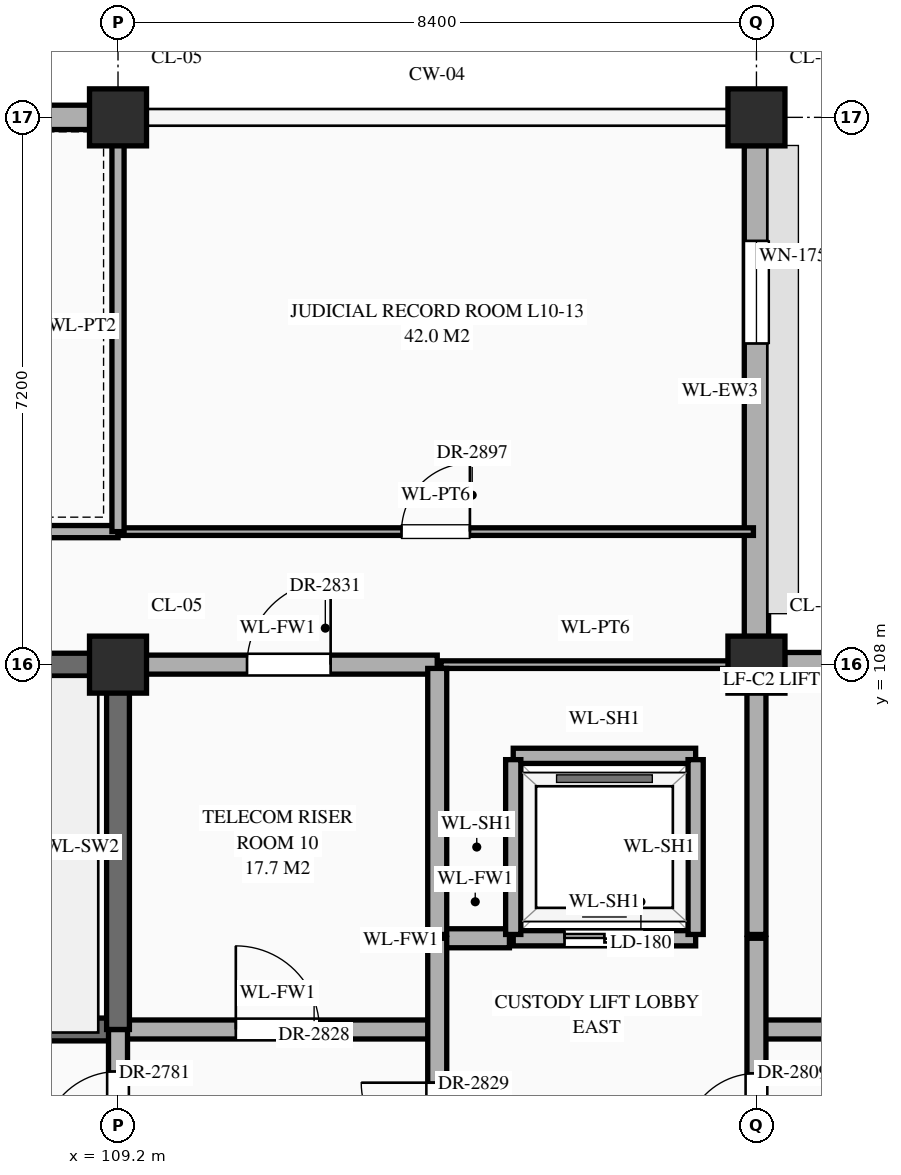
"""IFC4 building model, lengths in metres.
Left out: names, types, materials, properties, quantities, classifications, styles, units other than length and angle.
Written with IfcOpenShell. Run it as: python <this file> out.ifc"""

import sys

from ifc_helpers import new_model, si_unit, direction, frame, frame_2d, origin, origin_2d, place, context, subcontext, project, spatial, rectangle, extrude, element, fill, save


model = new_model("IFC4")
c1 = context("Model", 3, precision=1e-05, world=origin(), true_north=direction((0.0, 1.0)))
c2 = subcontext(c1, "Body", "Model", "MODEL_VIEW")
j1 = project(units=[si_unit("LENGTHUNIT", "METRE"), si_unit("PLANEANGLEUNIT", "RADIAN")], contexts=[c1])
p1 = place(None, origin())
s1 = spatial("IfcSite", under=j1, at=p1, CompositionType="ELEMENT")
p2 = place(p1, origin())
s2 = spatial("IfcBuilding", under=s1, at=p2, CompositionType="ELEMENT")
p3 = place(p2, frame((0.0, 0.0, 43.5)))
s3 = spatial("IfcBuildingStorey", under=s2, at=p3, CompositionType="ELEMENT", Elevation=43.5)
for number, where, z_axis, x_axis in (
    (1, (109.2, 108.0, 0.0), (0.0, 0.0, 1.0), (1.0, 0.0, 0.0)),
    (2, (109.2, 115.2, 0.0), (0.0, 0.0, 1.0), (1.0, 0.0, 0.0)),
    (3, (117.6, 108.0, 0.0), (0.0, 0.0, 1.0), (1.0, 0.0, 0.0)),
    (4, (117.6, 115.2, 0.0), (0.0, 0.0, 1.0), (1.0, 0.0, 0.0)),
):
    element("IfcColumn", number, at=place(p3, frame(where, z_axis=z_axis, x_axis=x_axis)), inside=s3, PredefinedType="COLUMN", context=c2, shape_type="SweptSolid", body=[
        extrude(rectangle(XDim=0.75, YDim=0.75, at=origin_2d()), origin(), (0.0, 0.0, 1.0), 4.2),
    ])
p4 = place(p3, frame((101.17, 115.2, 0.0), z_axis=(0.0, 0.0, 1.0), x_axis=(1.0, 0.0, 0.0)))
e5 = element("IfcWall", 5, at=p4, inside=s3, PredefinedType="STANDARD", context=c2, shape_type="SweptSolid", body=[
    extrude(rectangle(XDim=7.66, YDim=0.32, at=frame_2d((3.83, 0.0))), origin(), (0.0, 0.0, 1.0), 3.35),
])
p5 = place(p3, frame((117.6, 108.37, 0.0), z_axis=(0.0, 0.0, 1.0), x_axis=(0.0, 1.0, 0.0)))
e6 = element("IfcWall", 6, at=p5, inside=s3, PredefinedType="STANDARD", context=c2, shape_type="SweptSolid", body=[
    extrude(rectangle(XDim=6.46, YDim=0.32, at=frame_2d((3.23, 0.0))), origin(), (0.0, 0.0, 1.0), 3.35),
])
p6 = place(p5, frame((3.855, 0.0, 0.85)))
e7 = element("IfcOpeningElement", 7, at=p6, cuts=e6, PredefinedType="OPENING", context=c2, shape_type="SweptSolid", body=[
    extrude(rectangle(XDim=1.35, YDim=1.38, at=frame_2d((0.675, 0.69))), frame((0.0, 0.172, 0.0), z_axis=(0.0, -1.0, 0.0), x_axis=(1.0, 0.0, 0.0)), (0.0, 0.0, 1.0), 0.344),
])
p7 = place(p3, frame((117.97, 108.0, 0.0), z_axis=(0.0, 0.0, 1.0), x_axis=(1.0, 0.0, 0.0)))
e8 = element("IfcWall", 8, at=p7, inside=s3, PredefinedType="STANDARD", context=c2, shape_type="SweptSolid", body=[
    extrude(rectangle(XDim=7.66, YDim=0.32, at=frame_2d((3.83, 0.0))), origin(), (0.0, 0.0, 1.0), 3.35),
])
p8 = place(p3, frame((100.8, 103.2, 0.0), z_axis=(0.0, 0.0, 1.0), x_axis=(1.0, 0.0, 0.0)))
e9 = element("IfcWall", 9, at=p8, inside=s3, PredefinedType="SHEAR", context=c2, shape_type="SweptSolid", body=[
    extrude(rectangle(XDim=8.4, YDim=0.3, at=frame_2d((4.2, 0.0))), origin(), (0.0, 0.0, 1.0), 3.95),
])
p9 = place(p8, frame((0.65, 0.0, 0.0)))
e10 = element("IfcOpeningElement", 10, at=p9, cuts=e9, PredefinedType="OPENING", context=c2, shape_type="SweptSolid", body=[
    extrude(rectangle(XDim=1.1, YDim=2.2, at=frame_2d((0.55, 1.1))), frame((0.0, 0.162, 0.0), z_axis=(0.0, -1.0, 0.0), x_axis=(1.0, 0.0, 0.0)), (0.0, 0.0, 1.0), 0.324),
])
p10 = place(p3, frame((109.2, 103.2, 0.0), z_axis=(0.0, 0.0, 1.0), x_axis=(1.0, 0.0, 0.0)))
e11 = element("IfcWall", 11, at=p10, inside=s3, PredefinedType="STANDARD", context=c2, shape_type="SweptSolid", body=[
    extrude(rectangle(XDim=4.2, YDim=0.25, at=frame_2d((2.1, 0.0))), origin(), (0.0, 0.0, 1.0), 3.95),
])
p11 = place(p10, frame((1.55, 0.0, 0.0)))
e12 = element("IfcOpeningElement", 12, at=p11, cuts=e11, PredefinedType="OPENING", context=c2, shape_type="SweptSolid", body=[
    extrude(rectangle(XDim=1.1, YDim=2.2, at=frame_2d((0.55, 1.1))), frame((0.0, 0.137, 0.0), z_axis=(0.0, -1.0, 0.0), x_axis=(1.0, 0.0, 0.0)), (0.0, 0.0, 1.0), 0.274),
])
p12 = place(p3, frame((117.6, 103.2, 0.0), z_axis=(0.0, 0.0, 1.0), x_axis=(1.0, 0.0, 0.0)))
e13 = element("IfcWall", 13, at=p12, inside=s3, PredefinedType="STANDARD", context=c2, shape_type="SweptSolid", body=[
    extrude(rectangle(XDim=4.2, YDim=0.25, at=frame_2d((2.1, 0.0))), origin(), (0.0, 0.0, 1.0), 4.0),
])
p13 = place(p12, frame((1.55, 0.0, 0.0)))
e14 = element("IfcOpeningElement", 14, at=p13, cuts=e13, PredefinedType="OPENING", context=c2, shape_type="SweptSolid", body=[
    extrude(rectangle(XDim=1.1, YDim=2.2, at=frame_2d((0.55, 1.1))), frame((0.0, 0.137, 0.0), z_axis=(0.0, -1.0, 0.0), x_axis=(1.0, 0.0, 0.0)), (0.0, 0.0, 1.0), 0.274),
])
p14 = place(p3, frame((113.45, 104.4, 0.0), z_axis=(0.0, 0.0, 1.0), x_axis=(1.0, 0.0, 0.0)))
e15 = element("IfcWall", 15, at=p14, inside=s3, PredefinedType="STANDARD", context=c2, shape_type="SweptSolid", body=[
    extrude(rectangle(XDim=0.9, YDim=0.25, at=frame_2d((0.45, 0.0))), origin(), (0.0, 0.0, 1.0), 3.95),
])
p15 = place(p3, frame((114.4, 104.4, 0.0), z_axis=(0.0, 0.0, 1.0), x_axis=(1.0, 0.0, 0.0)))
e16 = element("IfcWall", 16, at=p15, inside=s3, PredefinedType="STANDARD", context=c2, shape_type="SweptSolid", body=[
    extrude(rectangle(XDim=2.4, YDim=0.2, at=frame_2d((1.2, 0.0))), origin(), (0.0, 0.0, 1.0), 3.95),
])
p16 = place(p15, frame((0.675, 0.0, 0.0)))
e17 = element("IfcOpeningElement", 17, at=p16, cuts=e16, PredefinedType="OPENING", context=c2, shape_type="SweptSolid", body=[
    extrude(rectangle(XDim=1.05, YDim=2.15, at=frame_2d((0.525, 1.075))), frame((0.0, 0.112, 0.0), z_axis=(0.0, -1.0, 0.0), x_axis=(1.0, 0.0, 0.0)), (0.0, 0.0, 1.0), 0.224),
])
p17 = place(p3, frame((114.4, 106.8, 0.0), z_axis=(0.0, 0.0, 1.0), x_axis=(1.0, 0.0, 0.0)))
e18 = element("IfcWall", 18, at=p17, inside=s3, PredefinedType="STANDARD", context=c2, shape_type="SweptSolid", body=[
    extrude(rectangle(XDim=2.4, YDim=0.2, at=frame_2d((1.2, 0.0))), origin(), (0.0, 0.0, 1.0), 3.95),
])
p18 = place(p3, frame((100.8, 108.0, 0.0), z_axis=(0.0, 0.0, 1.0), x_axis=(1.0, 0.0, 0.0)))
e19 = element("IfcWall", 19, at=p18, inside=s3, PredefinedType="SHEAR", context=c2, shape_type="SweptSolid", body=[
    extrude(rectangle(XDim=8.4, YDim=0.3, at=frame_2d((4.2, 0.0))), origin(), (0.0, 0.0, 1.0), 3.95),
])
p19 = place(p3, frame((109.2, 108.0, 0.0), z_axis=(0.0, 0.0, 1.0), x_axis=(1.0, 0.0, 0.0)))
e20 = element("IfcWall", 20, at=p19, inside=s3, PredefinedType="STANDARD", context=c2, shape_type="SweptSolid", body=[
    extrude(rectangle(XDim=4.2, YDim=0.25, at=frame_2d((2.1, 0.0))), origin(), (0.0, 0.0, 1.0), 3.1),
])
p20 = place(p19, frame((1.698, 0.0, 0.0)))
e21 = element("IfcOpeningElement", 21, at=p20, cuts=e20, PredefinedType="OPENING", context=c2, shape_type="SweptSolid", body=[
    extrude(rectangle(XDim=1.1, YDim=2.2, at=frame_2d((0.55, 1.1))), frame((0.0, 0.137, 0.0), z_axis=(0.0, -1.0, 0.0), x_axis=(1.0, 0.0, 0.0)), (0.0, 0.0, 1.0), 0.274),
])
p21 = place(p3, frame((113.45, 108.0, 0.0), z_axis=(0.0, 0.0, 1.0), x_axis=(1.0, 0.0, 0.0)))
e22 = element("IfcWall", 22, at=p21, inside=s3, PredefinedType="STANDARD", context=c2, shape_type="SweptSolid", body=[
    extrude(rectangle(XDim=4.06, YDim=0.1, at=frame_2d((2.03, 0.0))), origin(), (0.0, 0.0, 1.0), 3.1),
])
p22 = place(p3, frame((92.4, 109.75, 0.0), z_axis=(0.0, 0.0, 1.0), x_axis=(1.0, 0.0, 0.0)))
e23 = element("IfcWall", 23, at=p22, inside=s3, PredefinedType="STANDARD", context=c2, shape_type="SweptSolid", body=[
    extrude(rectangle(XDim=16.8, YDim=0.16, at=frame_2d((8.4, 0.0))), origin(), (0.0, 0.0, 1.0), 4.0),
])
p23 = place(p22, frame((7.625, 0.0, 0.0)))
e24 = element("IfcOpeningElement", 24, at=p23, cuts=e23, PredefinedType="OPENING", context=c2, shape_type="SweptSolid", body=[
    extrude(rectangle(XDim=1.55, YDim=2.35, at=frame_2d((0.775, 1.175))), frame((0.0, 0.092, 0.0), z_axis=(0.0, -1.0, 0.0), x_axis=(1.0, 0.0, 0.0)), (0.0, 0.0, 1.0), 0.184),
])
p24 = place(p3, frame((109.2, 109.75, 0.0), z_axis=(0.0, 0.0, 1.0), x_axis=(1.0, 0.0, 0.0)))
e25 = element("IfcWall", 25, at=p24, inside=s3, PredefinedType="STANDARD", context=c2, shape_type="SweptSolid", body=[
    extrude(rectangle(XDim=8.36, YDim=0.1, at=frame_2d((4.18, 0.0))), origin(), (0.0, 0.0, 1.0), 4.0),
])
p25 = place(p24, frame((3.73, 0.0, 0.0)))
e26 = element("IfcOpeningElement", 26, at=p25, cuts=e25, PredefinedType="OPENING", context=c2, shape_type="SweptSolid", body=[
    extrude(rectangle(XDim=0.9, YDim=2.15, at=frame_2d((0.45, 1.075))), frame((0.0, 0.062, 0.0), z_axis=(0.0, -1.0, 0.0), x_axis=(1.0, 0.0, 0.0)), (0.0, 0.0, 1.0), 0.124),
])
p26 = place(p3, frame((109.2, 100.8, 0.0), z_axis=(0.0, 0.0, 1.0), x_axis=(0.0, 1.0, 0.0)))
e27 = element("IfcWall", 27, at=p26, inside=s3, PredefinedType="STANDARD", context=c2, shape_type="SweptSolid", body=[
    extrude(rectangle(XDim=2.4, YDim=0.25, at=frame_2d((1.2, 0.0))), origin(), (0.0, 0.0, 1.0), 3.2),
])
p27 = place(p26, frame((0.847, 0.0, 0.0)))
e28 = element("IfcOpeningElement", 28, at=p27, cuts=e27, PredefinedType="OPENING", context=c2, shape_type="SweptSolid", body=[
    extrude(rectangle(XDim=1.0, YDim=2.2, at=frame_2d((0.5, 1.1))), frame((0.0, 0.137, 0.0), z_axis=(0.0, -1.0, 0.0), x_axis=(1.0, 0.0, 0.0)), (0.0, 0.0, 1.0), 0.274),
])
p28 = place(p3, frame((109.2, 103.2, 0.0), z_axis=(0.0, 0.0, 1.0), x_axis=(0.0, 1.0, 0.0)))
e29 = element("IfcWall", 29, at=p28, inside=s3, PredefinedType="SHEAR", context=c2, shape_type="SweptSolid", body=[
    extrude(rectangle(XDim=4.8, YDim=0.3, at=frame_2d((2.4, 0.0))), origin(), (0.0, 0.0, 1.0), 3.95),
])
p29 = place(p3, frame((109.2, 109.75, 0.0), z_axis=(0.0, 0.0, 1.0), x_axis=(0.0, 1.0, 0.0)))
e30 = element("IfcWall", 30, at=p29, inside=s3, PredefinedType="STANDARD", context=c2, shape_type="SweptSolid", body=[
    extrude(rectangle(XDim=5.41, YDim=0.16, at=frame_2d((2.705, 0.0))), origin(), (0.0, 0.0, 1.0), 3.25),
])
p30 = place(p3, frame((113.4, 100.8, 0.0), z_axis=(0.0, 0.0, 1.0), x_axis=(0.0, 1.0, 0.0)))
e31 = element("IfcWall", 31, at=p30, inside=s3, PredefinedType="STANDARD", context=c2, shape_type="SweptSolid", body=[
    extrude(rectangle(XDim=3.6, YDim=0.25, at=frame_2d((1.8, 0.0))), origin(), (0.0, 0.0, 1.0), 3.95),
])
p31 = place(p30, frame((0.7, 0.0, 0.0)))
e32 = element("IfcOpeningElement", 32, at=p31, cuts=e31, PredefinedType="OPENING", context=c2, shape_type="SweptSolid", body=[
    extrude(rectangle(XDim=1.0, YDim=2.2, at=frame_2d((0.5, 1.1))), frame((0.0, 0.137, 0.0), z_axis=(0.0, -1.0, 0.0), x_axis=(1.0, 0.0, 0.0)), (0.0, 0.0, 1.0), 0.274),
])
p32 = place(p3, frame((113.4, 104.45, 0.0), z_axis=(0.0, 0.0, 1.0), x_axis=(0.0, 1.0, 0.0)))
e33 = element("IfcWall", 33, at=p32, inside=s3, PredefinedType="STANDARD", context=c2, shape_type="SweptSolid", body=[
    extrude(rectangle(XDim=3.5, YDim=0.25, at=frame_2d((1.75, 0.0))), origin(), (0.0, 0.0, 1.0), 3.95),
])
for number, where, z_axis, x_axis in (
    (34, (114.4, 104.45, 0.0), (0.0, 0.0, 1.0), (0.0, 1.0, 0.0)),
    (35, (116.8, 104.45, 0.0), (0.0, 0.0, 1.0), (0.0, 1.0, 0.0)),
):
    element("IfcWall", number, at=place(p3, frame(where, z_axis=z_axis, x_axis=x_axis)), inside=s3, PredefinedType="STANDARD", context=c2, shape_type="SweptSolid", body=[
        extrude(rectangle(XDim=2.3, YDim=0.2, at=frame_2d((1.15, 0.0))), origin(), (0.0, 0.0, 1.0), 3.95),
    ])
p33 = place(p3, frame((117.6, 91.2, 0.0), z_axis=(0.0, 0.0, 1.0), x_axis=(0.0, 1.0, 0.0)))
e36 = element("IfcWall", 36, at=p33, inside=s3, PredefinedType="STANDARD", context=c2, shape_type="SweptSolid", body=[
    extrude(rectangle(XDim=13.2, YDim=0.25, at=frame_2d((6.6, 0.0))), origin(), (0.0, 0.0, 1.0), 3.2),
])
p34 = place(p33, frame((0.502, 0.0, 0.0)))
e37 = element("IfcOpeningElement", 37, at=p34, cuts=e36, PredefinedType="OPENING", context=c2, shape_type="SweptSolid", body=[
    extrude(rectangle(XDim=1.1, YDim=2.2, at=frame_2d((0.55, 1.1))), frame((0.0, 0.137, 0.0), z_axis=(0.0, -1.0, 0.0), x_axis=(1.0, 0.0, 0.0)), (0.0, 0.0, 1.0), 0.274),
])
p35 = place(p33, frame((10.472, 0.0, 0.0)))
e38 = element("IfcOpeningElement", 38, at=p35, cuts=e36, PredefinedType="OPENING", context=c2, shape_type="SweptSolid", body=[
    extrude(rectangle(XDim=0.95, YDim=2.15, at=frame_2d((0.475, 1.075))), frame((0.0, 0.137, 0.0), z_axis=(0.0, -1.0, 0.0), x_axis=(1.0, 0.0, 0.0)), (0.0, 0.0, 1.0), 0.274),
])
p36 = place(p33, frame((3.272, 0.0, 0.0)))
e39 = element("IfcOpeningElement", 39, at=p36, cuts=e36, PredefinedType="OPENING", context=c2, shape_type="SweptSolid", body=[
    extrude(rectangle(XDim=0.95, YDim=2.15, at=frame_2d((0.475, 1.075))), frame((0.0, 0.137, 0.0), z_axis=(0.0, -1.0, 0.0), x_axis=(1.0, 0.0, 0.0)), (0.0, 0.0, 1.0), 0.274),
])
p37 = place(p3, frame((117.6, 104.45, 0.0), z_axis=(0.0, 0.0, 1.0), x_axis=(0.0, 1.0, 0.0)))
e40 = element("IfcWall", 40, at=p37, inside=s3, PredefinedType="STANDARD", context=c2, shape_type="SweptSolid", body=[
    extrude(rectangle(XDim=3.46, YDim=0.25, at=frame_2d((1.73, 0.0))), origin(), (0.0, 0.0, 1.0), 3.2),
])
p38 = place(p6, origin())
e41 = element("IfcWindow", 41, at=p38, inside=s3, PartitioningType="SINGLE_PANEL", PredefinedType="WINDOW", context=c2, shape_type="SweptSolid", body=[
    extrude(rectangle(XDim=1.35, YDim=1.38, at=frame_2d((0.675, 0.69))), frame((0.0, 0.03, 0.0), z_axis=(0.0, -1.0, 0.0), x_axis=(1.0, 0.0, 0.0)), (0.0, 0.0, 1.0), 0.06),
])
fill(e7, e41)
p39 = place(p16, origin())
e42 = element("IfcDoor", 42, at=p39, inside=s3, OperationType="DOUBLE_DOOR_SLIDING", PredefinedType="DOOR", context=c2, shape_type="SweptSolid", body=[
    extrude(rectangle(XDim=1.05, YDim=2.15, at=frame_2d((0.525, 1.075))), frame((0.0, 0.025, 0.0), z_axis=(0.0, -1.0, 0.0), x_axis=(1.0, 0.0, 0.0)), (0.0, 0.0, 1.0), 0.05),
])
fill(e17, e42)
p40 = place(p27, origin())
e43 = element("IfcDoor", 43, at=p40, inside=s3, OperationType="SINGLE_SWING_LEFT", PredefinedType="DOOR", context=c2, shape_type="SweptSolid", body=[
    extrude(rectangle(XDim=1.0, YDim=2.2, at=frame_2d((0.5, 1.1))), frame((0.0, 0.025, 0.0), z_axis=(0.0, -1.0, 0.0), x_axis=(1.0, 0.0, 0.0)), (0.0, 0.0, 1.0), 0.05),
])
fill(e28, e43)
p41 = place(p35, origin())
e44 = element("IfcDoor", 44, at=p41, inside=s3, OperationType="SINGLE_SWING_LEFT", PredefinedType="DOOR", context=c2, shape_type="SweptSolid", body=[
    extrude(rectangle(XDim=0.95, YDim=2.15, at=frame_2d((0.475, 1.075))), frame((0.0, 0.025, 0.0), z_axis=(0.0, -1.0, 0.0), x_axis=(1.0, 0.0, 0.0)), (0.0, 0.0, 1.0), 0.05),
])
fill(e38, e44)
p42 = place(p11, origin())
e45 = element("IfcDoor", 45, at=p42, inside=s3, OperationType="SINGLE_SWING_LEFT", PredefinedType="DOOR", context=c2, shape_type="SweptSolid", body=[
    extrude(rectangle(XDim=1.1, YDim=2.2, at=frame_2d((0.55, 1.1))), frame((0.0, 0.025, 0.0), z_axis=(0.0, -1.0, 0.0), x_axis=(1.0, 0.0, 0.0)), (0.0, 0.0, 1.0), 0.05),
])
fill(e12, e45)
p43 = place(p31, origin())
e46 = element("IfcDoor", 46, at=p43, inside=s3, OperationType="SINGLE_SWING_RIGHT", PredefinedType="DOOR", context=c2, shape_type="SweptSolid", body=[
    extrude(rectangle(XDim=1.0, YDim=2.2, at=frame_2d((0.5, 1.1))), frame((0.0, 0.025, 0.0), z_axis=(0.0, -1.0, 0.0), x_axis=(1.0, 0.0, 0.0)), (0.0, 0.0, 1.0), 0.05),
])
fill(e32, e46)
p44 = place(p20, origin())
e47 = element("IfcDoor", 47, at=p44, inside=s3, OperationType="SINGLE_SWING_RIGHT", PredefinedType="DOOR", context=c2, shape_type="SweptSolid", body=[
    extrude(rectangle(XDim=1.1, YDim=2.2, at=frame_2d((0.55, 1.1))), frame((0.0, 0.025, 0.0), z_axis=(0.0, -1.0, 0.0), x_axis=(1.0, 0.0, 0.0)), (0.0, 0.0, 1.0), 0.05),
])
fill(e21, e47)
p45 = place(p25, origin())
e48 = element("IfcDoor", 48, at=p45, inside=s3, OperationType="SINGLE_SWING_RIGHT", PredefinedType="DOOR", context=c2, shape_type="SweptSolid", body=[
    extrude(rectangle(XDim=0.9, YDim=2.15, at=frame_2d((0.45, 1.075))), frame((0.0, 0.025, 0.0), z_axis=(0.0, -1.0, 0.0), x_axis=(1.0, 0.0, 0.0)), (0.0, 0.0, 1.0), 0.05),
])
fill(e26, e48)
save(model, sys.argv[1])
